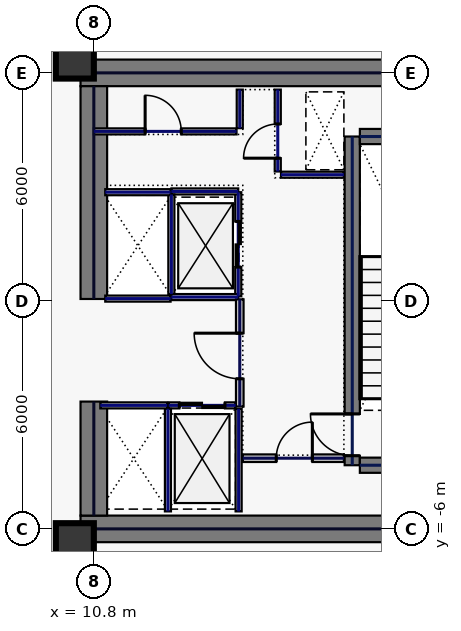
"""IFC4 building model, lengths in metres.
Left out: names, types, materials, properties, quantities, classifications, styles, units other than length and angle.
Written with IfcOpenShell. Run it as: python <this file> out.ifc"""

import sys

from ifc_helpers import new_model, si_unit, direction, frame, frame_2d, origin, origin_2d, place, context, subcontext, project, spatial, rectangle, hollow_rectangle, extrude, element, fill, save


model = new_model("IFC4")
c1 = context("Model", 3, precision=1e-05, world=origin(), true_north=direction((0.0, 1.0)))
c2 = subcontext(c1, "Body", "Model", "MODEL_VIEW")
j1 = project(units=[si_unit("LENGTHUNIT", "METRE"), si_unit("PLANEANGLEUNIT", "RADIAN")], contexts=[c1])
p1 = place(None, origin())
s1 = spatial("IfcSite", under=j1, at=p1, CompositionType="ELEMENT")
p2 = place(p1, origin())
s2 = spatial("IfcBuilding", under=s1, at=p2, CompositionType="ELEMENT")
p3 = place(p2, frame((0.0, 0.0, 125.4)))
s3 = spatial("IfcBuildingStorey", under=s2, at=p3, CompositionType="ELEMENT", Elevation=125.4)
for number, where, z_axis, x_axis in (
    (1, (10.45, 6.0, 0.0), (0.0, 0.0, 1.0), (1.0, 0.0, 0.0)),
    (2, (10.45, -6.0, 0.0), (0.0, 0.0, 1.0), (1.0, 0.0, 0.0)),
):
    element("IfcWall", number, at=place(p3, frame(where, z_axis=z_axis, x_axis=x_axis)), inside=s3, PredefinedType="SHEAR", context=c2, shape_type="SweptSolid", body=[
        extrude(rectangle(XDim=11.55, YDim=0.7, at=frame_2d((5.775, 0.0))), origin(), (0.0, 0.0, 1.0), 3.74),
    ])
p4 = place(p3, frame((10.8, -5.65, 0.0), z_axis=(0.0, 0.0, 1.0), x_axis=(0.0, 1.0, 0.0)))
e3 = element("IfcWall", 3, at=p4, inside=s3, PredefinedType="SHEAR", context=c2, shape_type="SweptSolid", body=[
    extrude(rectangle(XDim=3.0, YDim=0.7, at=frame_2d((1.5, 0.0))), origin(), (0.0, 0.0, 1.0), 3.74),
])
p5 = place(p3, frame((10.8, 0.05, 0.0), z_axis=(0.0, 0.0, 1.0), x_axis=(0.0, 1.0, 0.0)))
e4 = element("IfcWall", 4, at=p5, inside=s3, PredefinedType="SHEAR", context=c2, shape_type="SweptSolid", body=[
    extrude(rectangle(XDim=5.6, YDim=0.7, at=frame_2d((2.8, 0.0))), origin(), (0.0, 0.0, 1.0), 3.74),
])
p6 = place(p3, frame((17.6, -4.325, 0.0), z_axis=(0.0, 0.0, 1.0), x_axis=(0.0, 1.0, 0.0)))
e5 = element("IfcWall", 5, at=p6, inside=s3, PredefinedType="SHEAR", context=c2, shape_type="SweptSolid", body=[
    extrude(rectangle(XDim=8.65, YDim=0.4, at=frame_2d((4.325, 0.0))), origin(), (0.0, 0.0, 1.0), 3.74),
])
p7 = place(p6, frame((0.25, 0.0, 0.0)))
e6 = element("IfcOpeningElement", 6, at=p7, cuts=e5, PredefinedType="OPENING", context=c2, shape_type="SweptSolid", body=[
    extrude(rectangle(XDim=1.1, YDim=2.2, at=frame_2d((0.55, 1.1))), frame((0.0, 0.21, 0.0), z_axis=(0.0, -1.0, 0.0), x_axis=(1.0, 0.0, 0.0)), (0.0, 0.0, 1.0), 0.42),
])
for number, where, z_axis, x_axis in (
    (7, (17.8, -4.325, 0.0), (0.0, 0.0, 1.0), (1.0, 0.0, 0.0)),
    (8, (17.8, 4.325, 0.0), (0.0, 0.0, 1.0), (1.0, 0.0, 0.0)),
):
    element("IfcWall", number, at=place(p3, frame(where, z_axis=z_axis, x_axis=x_axis)), inside=s3, PredefinedType="SHEAR", context=c2, shape_type="SweptSolid", body=[
        extrude(rectangle(XDim=3.4, YDim=0.4, at=frame_2d((1.7, 0.0))), origin(), (0.0, 0.0, 1.0), 3.74),
    ])
for number, where, z_axis, x_axis in (
    (9, (10.3, -6.35, 0.0), (0.0, 0.0, 1.0), (1.0, 0.0, 0.0)),
    (10, (10.3, 6.35, 0.0), (0.0, 0.0, 1.0), (1.0, 0.0, 0.0)),
):
    element("IfcColumn", number, at=place(p3, frame(where, z_axis=z_axis, x_axis=x_axis)), inside=s3, PredefinedType="COLUMN", context=c2, shape_type="SweptSolid", body=[
        extrude(hollow_rectangle(XDim=1.0, YDim=1.0, WallThickness=0.045, at=origin_2d()), origin(), (0.0, 0.0, 1.0), 3.74),
    ])
p8 = place(p3, frame((14.6, 0.12, 0.0), z_axis=(0.0, 0.0, 1.0), x_axis=(0.0, 1.0, 0.0)))
e11 = element("IfcWall", 11, at=p8, inside=s3, PredefinedType="PARTITIONING", context=c2, shape_type="SweptSolid", body=[
    extrude(rectangle(XDim=2.74, YDim=0.16, at=frame_2d((1.37, 0.0))), origin(), (0.0, 0.0, 1.0), 3.74),
])
p9 = place(p8, frame((0.77, 0.0, 0.0)))
e12 = element("IfcOpeningElement", 12, at=p9, cuts=e11, PredefinedType="OPENING", context=c2, shape_type="SweptSolid", body=[
    extrude(rectangle(XDim=1.2, YDim=2.2, at=frame_2d((0.6, 1.1))), frame((0.0, 0.09, 0.0), z_axis=(0.0, -1.0, 0.0), x_axis=(1.0, 0.0, 0.0)), (0.0, 0.0, 1.0), 0.18),
])
for number, where, z_axis, x_axis in (
    (13, (12.84, 0.1, 0.0), (0.0, 0.0, 1.0), (1.0, 0.0, 0.0)),
    (14, (12.84, 2.88, 0.0), (0.0, 0.0, 1.0), (1.0, 0.0, 0.0)),
):
    element("IfcWall", number, at=place(p3, frame(where, z_axis=z_axis, x_axis=x_axis)), inside=s3, PredefinedType="PARTITIONING", context=c2, shape_type="SweptSolid", body=[
        extrude(rectangle(XDim=1.76, YDim=0.16, at=frame_2d((0.88, 0.0))), origin(), (0.0, 0.0, 1.0), 3.74),
    ])
p10 = place(p3, frame((12.84, 0.18, 0.0), z_axis=(0.0, 0.0, 1.0), x_axis=(0.0, 1.0, 0.0)))
e15 = element("IfcWall", 15, at=p10, inside=s3, PredefinedType="PARTITIONING", context=c2, shape_type="SweptSolid", body=[
    extrude(rectangle(XDim=2.62, YDim=0.16, at=frame_2d((1.31, 0.0))), origin(), (0.0, 0.0, 1.0), 3.74),
])
p11 = place(p3, frame((12.77, -2.75, 0.0), z_axis=(0.0, 0.0, 1.0), x_axis=(1.0, 0.0, 0.0)))
e16 = element("IfcWall", 16, at=p11, inside=s3, PredefinedType="PARTITIONING", context=c2, shape_type="SweptSolid", body=[
    extrude(rectangle(XDim=1.76, YDim=0.16, at=frame_2d((0.88, 0.0))), origin(), (0.0, 0.0, 1.0), 3.74),
])
p12 = place(p11, frame((0.28, 0.0, 0.0)))
e17 = element("IfcOpeningElement", 17, at=p12, cuts=e16, PredefinedType="OPENING", context=c2, shape_type="SweptSolid", body=[
    extrude(rectangle(XDim=1.2, YDim=2.2, at=frame_2d((0.6, 1.1))), frame((0.0, 0.09, 0.0), z_axis=(0.0, -1.0, 0.0), x_axis=(1.0, 0.0, 0.0)), (0.0, 0.0, 1.0), 0.18),
])
for number, where, z_axis, x_axis in (
    (18, (12.75, -5.54, 0.0), (0.0, 0.0, 1.0), (0.0, 1.0, 0.0)),
    (19, (14.61, -5.54, 0.0), (0.0, 0.0, 1.0), (0.0, 1.0, 0.0)),
):
    element("IfcWall", number, at=place(p3, frame(where, z_axis=z_axis, x_axis=x_axis)), inside=s3, PredefinedType="PARTITIONING", context=c2, shape_type="SweptSolid", body=[
        extrude(rectangle(XDim=2.7, YDim=0.16, at=frame_2d((1.35, 0.0))), origin(), (0.0, 0.0, 1.0), 3.74),
    ])
p13 = place(p3, frame((10.97, -2.75, 0.0), z_axis=(0.0, 0.0, 1.0), x_axis=(1.0, 0.0, 0.0)))
e20 = element("IfcWall", 20, at=p13, inside=s3, PredefinedType="PARTITIONING", context=c2, shape_type="SweptSolid", body=[
    extrude(rectangle(XDim=1.76, YDim=0.16, at=frame_2d((0.88, 0.0))), origin(), (0.0, 0.0, 1.0), 3.74),
])
for number, where, z_axis, x_axis in (
    (21, (11.1, 0.06, 0.0), (0.0, 0.0, 1.0), (1.0, 0.0, 0.0)),
    (22, (11.1, 2.86, 0.0), (0.0, 0.0, 1.0), (1.0, 0.0, 0.0)),
):
    element("IfcWall", number, at=place(p3, frame(where, z_axis=z_axis, x_axis=x_axis)), inside=s3, PredefinedType="PARTITIONING", context=c2, shape_type="SweptSolid", body=[
        extrude(rectangle(XDim=1.72, YDim=0.16, at=frame_2d((0.86, 0.0))), origin(), (0.0, 0.0, 1.0), 3.74),
    ])
p14 = place(p3, frame((15.64, 3.405, 0.0), z_axis=(0.0, 0.0, 1.0), x_axis=(0.0, 1.0, 0.0)))
e23 = element("IfcWall", 23, at=p14, inside=s3, PredefinedType="PARTITIONING", context=c2, shape_type="SweptSolid", body=[
    extrude(rectangle(XDim=2.155, YDim=0.16, at=frame_2d((1.078, 0.0))), origin(), (0.0, 0.0, 1.0), 3.74),
])
p15 = place(p14, frame((0.35, 0.0, 0.0)))
e24 = element("IfcOpeningElement", 24, at=p15, cuts=e23, PredefinedType="OPENING", context=c2, shape_type="SweptSolid", body=[
    extrude(rectangle(XDim=0.9, YDim=2.2, at=frame_2d((0.45, 1.1))), frame((0.0, 0.09, 0.0), z_axis=(0.0, -1.0, 0.0), x_axis=(1.0, 0.0, 0.0)), (0.0, 0.0, 1.0), 0.18),
])
p16 = place(p3, frame((15.725, 3.32, 0.0), z_axis=(0.0, 0.0, 1.0), x_axis=(1.0, 0.0, 0.0)))
e25 = element("IfcWall", 25, at=p16, inside=s3, PredefinedType="PARTITIONING", context=c2, shape_type="SweptSolid", body=[
    extrude(rectangle(XDim=1.655, YDim=0.16, at=frame_2d((0.827, 0.0))), origin(), (0.0, 0.0, 1.0), 3.74),
])
p17 = place(p3, frame((14.72, -4.14, 0.0), z_axis=(0.0, 0.0, 1.0), x_axis=(1.0, 0.0, 0.0)))
e26 = element("IfcWall", 26, at=p17, inside=s3, PredefinedType="SOLIDWALL", context=c2, shape_type="SweptSolid", body=[
    extrude(rectangle(XDim=2.66, YDim=0.2, at=frame_2d((1.33, 0.0))), origin(), (0.0, 0.0, 1.0), 3.74),
])
p18 = place(p17, frame((0.88, 0.0, 0.0)))
e27 = element("IfcOpeningElement", 27, at=p18, cuts=e26, PredefinedType="OPENING", context=c2, shape_type="SweptSolid", body=[
    extrude(rectangle(XDim=0.95, YDim=2.2, at=frame_2d((0.475, 1.1))), frame((0.0, 0.11, 0.0), z_axis=(0.0, -1.0, 0.0), x_axis=(1.0, 0.0, 0.0)), (0.0, 0.0, 1.0), 0.22),
])
p19 = place(p3, frame((10.8, 4.46, 0.0), z_axis=(0.0, 0.0, 1.0), x_axis=(1.0, 0.0, 0.0)))
e28 = element("IfcWall", 28, at=p19, inside=s3, PredefinedType="PARTITIONING", context=c2, shape_type="SweptSolid", body=[
    extrude(rectangle(XDim=3.755, YDim=0.16, at=frame_2d((1.877, 0.0))), origin(), (0.0, 0.0, 1.0), 3.74),
])
p20 = place(p19, frame((1.35, 0.0, 0.0)))
e29 = element("IfcOpeningElement", 29, at=p20, cuts=e28, PredefinedType="OPENING", context=c2, shape_type="SweptSolid", body=[
    extrude(rectangle(XDim=0.95, YDim=2.2, at=frame_2d((0.475, 1.1))), frame((0.0, 0.09, 0.0), z_axis=(0.0, -1.0, 0.0), x_axis=(1.0, 0.0, 0.0)), (0.0, 0.0, 1.0), 0.18),
])
p21 = place(p3, frame((14.64, 4.545, 0.0), z_axis=(0.0, 0.0, 1.0), x_axis=(0.0, 1.0, 0.0)))
e30 = element("IfcWall", 30, at=p21, inside=s3, PredefinedType="PARTITIONING", context=c2, shape_type="SweptSolid", body=[
    extrude(rectangle(XDim=1.015, YDim=0.16, at=frame_2d((0.508, 0.0))), origin(), (0.0, 0.0, 1.0), 3.74),
])
p22 = place(p3, frame((14.64, -2.78, 0.0), z_axis=(0.0, 0.0, 1.0), x_axis=(0.0, 1.0, 0.0)))
e31 = element("IfcWall", 31, at=p22, inside=s3, PredefinedType="SOLIDWALL", context=c2, shape_type="SweptSolid", body=[
    extrude(rectangle(XDim=2.82, YDim=0.2, at=frame_2d((1.41, 0.0))), origin(), (0.0, 0.0, 1.0), 3.74),
])
p23 = place(p22, frame((0.73, 0.0, 0.0)))
e32 = element("IfcOpeningElement", 32, at=p23, cuts=e31, PredefinedType="OPENING", context=c2, shape_type="SweptSolid", body=[
    extrude(rectangle(XDim=1.2, YDim=2.2, at=frame_2d((0.6, 1.1))), frame((0.0, 0.11, 0.0), z_axis=(0.0, -1.0, 0.0), x_axis=(1.0, 0.0, 0.0)), (0.0, 0.0, 1.0), 0.22),
])
p24 = place(p3, frame((10.58, 7.435, 0.0), z_axis=(0.0, 0.0, 1.0), x_axis=(0.0, -1.0, 0.0)))
e33 = element("IfcWall", 33, at=p24, inside=s3, PredefinedType="PARTITIONING", context=c2, shape_type="SweptSolid", body=[
    extrude(rectangle(XDim=1.015, YDim=0.16, at=frame_2d((0.508, 0.0))), origin(), (0.0, 0.0, 1.0), 3.74),
])
p25 = place(p3, frame((10.58, -6.42, 0.0), z_axis=(0.0, 0.0, 1.0), x_axis=(0.0, -1.0, 0.0)))
e34 = element("IfcWall", 34, at=p25, inside=s3, PredefinedType="PARTITIONING", context=c2, shape_type="SweptSolid", body=[
    extrude(rectangle(XDim=0.965, YDim=0.16, at=frame_2d((0.482, 0.0))), origin(), (0.0, 0.0, 1.0), 3.74),
])
p26 = place(p7, origin())
e35 = element("IfcDoor", 35, at=p26, inside=s3, OperationType="SINGLE_SWING_RIGHT", PredefinedType="DOOR", context=c2, shape_type="SweptSolid", body=[
    extrude(rectangle(XDim=1.1, YDim=2.2, at=frame_2d((0.55, 1.1))), frame((0.0, 0.025, 0.0), z_axis=(0.0, -1.0, 0.0), x_axis=(1.0, 0.0, 0.0)), (0.0, 0.0, 1.0), 0.05),
])
fill(e6, e35)
p27 = place(p9, origin())
e36 = element("IfcDoor", 36, at=p27, inside=s3, OperationType="SLIDING_TO_LEFT", PredefinedType="DOOR", context=c2, shape_type="SweptSolid", body=[
    extrude(rectangle(XDim=1.2, YDim=2.2, at=frame_2d((0.6, 1.1))), frame((0.0, 0.025, 0.0), z_axis=(0.0, -1.0, 0.0), x_axis=(1.0, 0.0, 0.0)), (0.0, 0.0, 1.0), 0.05),
])
fill(e12, e36)
p28 = place(p12, origin())
e37 = element("IfcDoor", 37, at=p28, inside=s3, OperationType="SLIDING_TO_LEFT", PredefinedType="DOOR", context=c2, shape_type="SweptSolid", body=[
    extrude(rectangle(XDim=1.2, YDim=2.2, at=frame_2d((0.6, 1.1))), frame((0.0, 0.025, 0.0), z_axis=(0.0, -1.0, 0.0), x_axis=(1.0, 0.0, 0.0)), (0.0, 0.0, 1.0), 0.05),
])
fill(e17, e37)
p29 = place(p15, origin())
e38 = element("IfcDoor", 38, at=p29, inside=s3, OperationType="SINGLE_SWING_LEFT", PredefinedType="DOOR", context=c2, shape_type="SweptSolid", body=[
    extrude(rectangle(XDim=0.9, YDim=2.2, at=frame_2d((0.45, 1.1))), frame((0.0, 0.025, 0.0), z_axis=(0.0, -1.0, 0.0), x_axis=(1.0, 0.0, 0.0)), (0.0, 0.0, 1.0), 0.05),
])
fill(e24, e38)
p30 = place(p18, origin())
e39 = element("IfcDoor", 39, at=p30, inside=s3, OperationType="SINGLE_SWING_RIGHT", PredefinedType="DOOR", context=c2, shape_type="SweptSolid", body=[
    extrude(rectangle(XDim=0.95, YDim=2.2, at=frame_2d((0.475, 1.1))), frame((0.0, 0.025, 0.0), z_axis=(0.0, -1.0, 0.0), x_axis=(1.0, 0.0, 0.0)), (0.0, 0.0, 1.0), 0.05),
])
fill(e27, e39)
p31 = place(p20, origin())
e40 = element("IfcDoor", 40, at=p31, inside=s3, OperationType="SINGLE_SWING_LEFT", PredefinedType="DOOR", context=c2, shape_type="SweptSolid", body=[
    extrude(rectangle(XDim=0.95, YDim=2.2, at=frame_2d((0.475, 1.1))), frame((0.0, 0.025, 0.0), z_axis=(0.0, -1.0, 0.0), x_axis=(1.0, 0.0, 0.0)), (0.0, 0.0, 1.0), 0.05),
])
fill(e29, e40)
p32 = place(p23, origin())
e41 = element("IfcDoor", 41, at=p32, inside=s3, OperationType="SINGLE_SWING_RIGHT", PredefinedType="DOOR", context=c2, shape_type="SweptSolid", body=[
    extrude(rectangle(XDim=1.2, YDim=2.2, at=frame_2d((0.6, 1.1))), frame((0.0, 0.025, 0.0), z_axis=(0.0, -1.0, 0.0), x_axis=(1.0, 0.0, 0.0)), (0.0, 0.0, 1.0), 0.05),
])
fill(e32, e41)
save(model, sys.argv[1])
